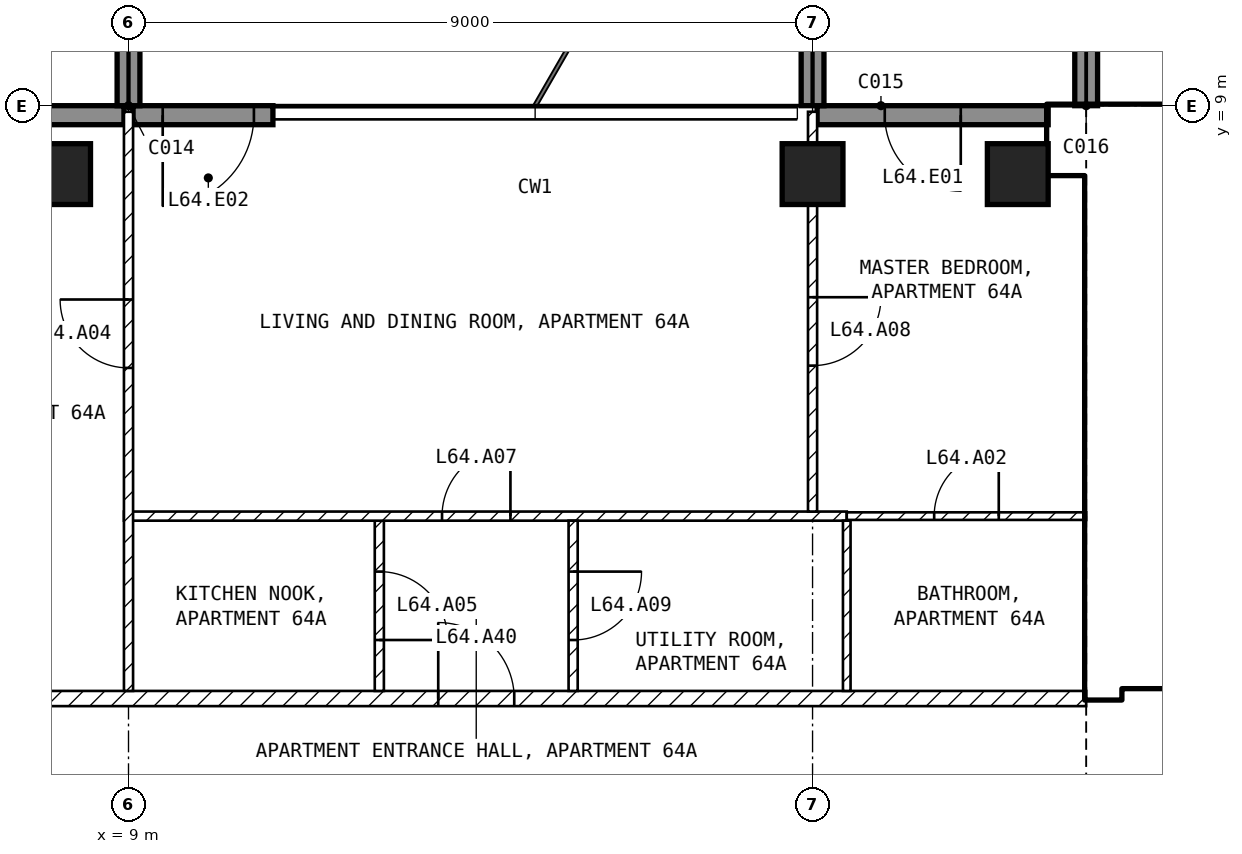
"""IFC4 building model, lengths in metres.
Left out: names, types, materials, properties, quantities, classifications, styles, units other than length and angle.
Written with IfcOpenShell. Run it as: python <this file> out.ifc"""

import sys

from ifc_helpers import new_model, si_unit, direction, frame, frame_2d, origin, origin_2d, place, context, subcontext, project, spatial, rectangle, extrude, element, fill, save


model = new_model("IFC4")
c1 = context("Model", 3, precision=1e-05, world=origin(), true_north=direction((0.0, 1.0)))
c2 = subcontext(c1, "Body", "Model", "MODEL_VIEW")
j1 = project(units=[si_unit("LENGTHUNIT", "METRE"), si_unit("PLANEANGLEUNIT", "RADIAN")], contexts=[c1])
p1 = place(None, origin())
s1 = spatial("IfcSite", under=j1, at=p1, CompositionType="ELEMENT")
p2 = place(p1, origin())
s2 = spatial("IfcBuilding", under=s1, at=p2, CompositionType="ELEMENT")
p3 = place(p2, frame((0.0, 0.0, 253.5)))
s3 = spatial("IfcBuildingStorey", under=s2, at=p3, CompositionType="ELEMENT", Elevation=253.5)
for number, where, z_axis, x_axis in (
    (1, (8.1, 8.1, -0.25), (0.0, 0.0, 1.0), (1.0, 0.0, 0.0)),
    (2, (18.0, 8.1, -0.25), (0.0, 0.0, 1.0), (1.0, 0.0, 0.0)),
    (3, (20.7, 8.1, -0.25), (0.0, 0.0, 1.0), (1.0, 0.0, 0.0)),
):
    element("IfcColumn", number, at=place(p3, frame(where, z_axis=z_axis, x_axis=x_axis)), inside=s3, PredefinedType="COLUMN", context=c2, shape_type="SweptSolid", body=[
        extrude(rectangle(XDim=0.8, YDim=0.8, at=origin_2d()), origin(), (0.0, 0.0, 1.0), 3.5),
    ])
p4 = place(p3, frame((21.1, 8.875, 0.0), z_axis=(0.0, 0.0, 1.0), x_axis=(-1.0, 0.0, 0.0)))
e4 = element("IfcWall", 4, at=p4, inside=s3, PredefinedType="SOLIDWALL", context=c2, shape_type="SweptSolid", body=[
    extrude(rectangle(XDim=3.04, YDim=0.25, at=frame_2d((1.52, 0.0))), origin(), (0.0, 0.0, 1.0), 3.25),
])
p5 = place(p4, frame((1.15, 0.0, 0.0)))
e5 = element("IfcOpeningElement", 5, at=p5, cuts=e4, PredefinedType="OPENING", context=c2, shape_type="SweptSolid", body=[
    extrude(rectangle(XDim=1.0, YDim=2.4, at=frame_2d((0.5, 1.2))), frame((0.0, 0.135, 0.0), z_axis=(0.0, -1.0, 0.0), x_axis=(1.0, 0.0, 0.0)), (0.0, 0.0, 1.0), 0.27),
])
p6 = place(p3, frame((10.9, 8.875, 0.0), z_axis=(0.0, 0.0, 1.0), x_axis=(-1.0, 0.0, 0.0)))
e6 = element("IfcWall", 6, at=p6, inside=s3, PredefinedType="SOLIDWALL", context=c2, shape_type="SweptSolid", body=[
    extrude(rectangle(XDim=1.84, YDim=0.25, at=frame_2d((0.92, 0.0))), origin(), (0.0, 0.0, 1.0), 3.25),
])
p7 = place(p6, frame((0.25, 0.0, 0.0)))
e7 = element("IfcOpeningElement", 7, at=p7, cuts=e6, PredefinedType="OPENING", context=c2, shape_type="SweptSolid", body=[
    extrude(rectangle(XDim=1.2, YDim=2.4, at=frame_2d((0.6, 1.2))), frame((0.0, 0.135, 0.0), z_axis=(0.0, -1.0, 0.0), x_axis=(1.0, 0.0, 0.0)), (0.0, 0.0, 1.0), 0.27),
])
p8 = place(p3, frame((8.94, 8.875, 0.0), z_axis=(0.0, 0.0, 1.0), x_axis=(-1.0, 0.0, 0.0)))
e8 = element("IfcWall", 8, at=p8, inside=s3, PredefinedType="SOLIDWALL", context=c2, shape_type="SweptSolid", body=[
    extrude(rectangle(XDim=3.04, YDim=0.25, at=frame_2d((1.52, 0.0))), origin(), (0.0, 0.0, 1.0), 3.25),
])
p9 = place(p8, frame((1.59, 0.0, 0.0)))
e9 = element("IfcOpeningElement", 9, at=p9, cuts=e8, PredefinedType="OPENING", context=c2, shape_type="SweptSolid", body=[
    extrude(rectangle(XDim=1.2, YDim=2.4, at=frame_2d((0.6, 1.2))), frame((0.0, 0.135, 0.0), z_axis=(0.0, -1.0, 0.0), x_axis=(1.0, 0.0, 0.0)), (0.0, 0.0, 1.0), 0.27),
])
for number, where, z_axis, x_axis in (
    (10, (9.0, 9.0, 0.0), (0.0, 0.0, 1.0), (0.0, 1.0, 0.0)),
    (11, (18.0, 9.0, 0.0), (0.0, 0.0, 1.0), (0.0, 1.0, 0.0)),
    (12, (21.6, 9.0, 0.0), (0.0, 0.0, 1.0), (0.0, 1.0, 0.0)),
):
    element("IfcWall", number, at=place(p3, frame(where, z_axis=z_axis, x_axis=x_axis)), inside=s3, PredefinedType="SOLIDWALL", context=c2, shape_type="SweptSolid", body=[
        extrude(rectangle(XDim=2.7, YDim=0.3, at=frame_2d((1.35, 0.0))), origin(), (0.0, 0.0, 1.0), 3.25),
    ])
p10 = place(p3, frame((21.1, 8.55, 0.0), z_axis=(0.0, 0.0, 1.0), x_axis=(1.0, 0.0, 0.0)))
e13 = element("IfcWall", 13, at=p10, inside=s3, PredefinedType="SHEAR", context=c2, shape_type="SweptSolid", body=[
    extrude(rectangle(XDim=8.65, YDim=0.9, at=frame_2d((4.325, 0.0))), origin(), (0.0, 0.0, 1.0), 3.25),
])
p11 = place(p3, frame((21.825, 1.2, 0.0), z_axis=(0.0, 0.0, 1.0), x_axis=(0.0, 1.0, 0.0)))
e14 = element("IfcWall", 14, at=p11, inside=s3, PredefinedType="SHEAR", context=c2, shape_type="SweptSolid", body=[
    extrude(rectangle(XDim=6.9, YDim=0.45, at=frame_2d((3.45, 0.0))), origin(), (0.0, 0.0, 1.0), 3.25),
])
p12 = place(p3, frame((22.05, 1.45, 0.0), z_axis=(0.0, 0.0, 1.0), x_axis=(1.0, 0.0, 0.0)))
e15 = element("IfcWall", 15, at=p12, inside=s3, PredefinedType="SOLIDWALL", context=c2, shape_type="SweptSolid", body=[
    extrude(rectangle(XDim=11.3, YDim=0.2, at=frame_2d((5.65, 0.0))), origin(), (0.0, 0.0, 1.0), 3.25),
])
p13 = place(p12, frame((0.75, 0.0, 0.0)))
e16 = element("IfcOpeningElement", 16, at=p13, cuts=e15, PredefinedType="OPENING", context=c2, shape_type="SweptSolid", body=[
    extrude(rectangle(XDim=1.0, YDim=2.1, at=frame_2d((0.5, 1.05))), frame((0.0, 0.11, 0.0), z_axis=(0.0, -1.0, 0.0), x_axis=(1.0, 0.0, 0.0)), (0.0, 0.0, 1.0), 0.22),
])
p14 = place(p12, frame((3.25, 0.0, 0.0)))
e17 = element("IfcOpeningElement", 17, at=p14, cuts=e15, PredefinedType="OPENING", context=c2, shape_type="SweptSolid", body=[
    extrude(rectangle(XDim=1.0, YDim=2.1, at=frame_2d((0.5, 1.05))), frame((0.0, 0.11, 0.0), z_axis=(0.0, -1.0, 0.0), x_axis=(1.0, 0.0, 0.0)), (0.0, 0.0, 1.0), 0.22),
])
p15 = place(p12, frame((9.225, 0.0, 0.0)))
e18 = element("IfcOpeningElement", 18, at=p15, cuts=e15, PredefinedType="OPENING", context=c2, shape_type="SweptSolid", body=[
    extrude(rectangle(XDim=0.9, YDim=2.1, at=frame_2d((0.45, 1.05))), frame((0.0, 0.11, 0.0), z_axis=(0.0, -1.0, 0.0), x_axis=(1.0, 0.0, 0.0)), (0.0, 0.0, 1.0), 0.22),
])
p16 = place(p3, frame((22.05, 5.15, 0.0), z_axis=(0.0, 0.0, 1.0), x_axis=(1.0, 0.0, 0.0)))
e19 = element("IfcWall", 19, at=p16, inside=s3, PredefinedType="SOLIDWALL", context=c2, shape_type="SweptSolid", body=[
    extrude(rectangle(XDim=6.3, YDim=0.2, at=frame_2d((3.15, 0.0))), origin(), (0.0, 0.0, 1.0), 3.25),
])
p17 = place(p16, frame((0.2, 0.0, 0.0)))
e20 = element("IfcOpeningElement", 20, at=p17, cuts=e19, PredefinedType="OPENING", context=c2, shape_type="SweptSolid", body=[
    extrude(rectangle(XDim=1.0, YDim=2.1, at=frame_2d((0.5, 1.05))), frame((0.0, 0.11, 0.0), z_axis=(0.0, -1.0, 0.0), x_axis=(1.0, 0.0, 0.0)), (0.0, 0.0, 1.0), 0.22),
])
p18 = place(p3, frame((4.4, 1.2, 0.0), z_axis=(0.0, 0.0, 1.0), x_axis=(1.0, 0.0, 0.0)))
e21 = element("IfcWall", 21, at=p18, inside=s3, PredefinedType="PARTITIONING", context=c2, shape_type="SweptSolid", body=[
    extrude(rectangle(XDim=17.2, YDim=0.2, at=frame_2d((8.6, 0.0))), origin(), (0.0, 0.0, 1.0), 3.25),
])
p19 = place(p18, frame((8.675, 0.0, 0.0)))
e22 = element("IfcOpeningElement", 22, at=p19, cuts=e21, PredefinedType="OPENING", context=c2, shape_type="SweptSolid", body=[
    extrude(rectangle(XDim=1.0, YDim=2.1, at=frame_2d((0.5, 1.05))), frame((0.0, 0.11, 0.0), z_axis=(0.0, -1.0, 0.0), x_axis=(1.0, 0.0, 0.0)), (0.0, 0.0, 1.0), 0.22),
])
p20 = place(p3, frame((12.3, 3.54, 0.0), z_axis=(0.0, 0.0, 1.0), x_axis=(0.0, -1.0, 0.0)))
e23 = element("IfcWall", 23, at=p20, inside=s3, PredefinedType="PARTITIONING", context=c2, shape_type="SweptSolid", body=[
    extrude(rectangle(XDim=2.24, YDim=0.12, at=frame_2d((1.12, 0.0))), origin(), (0.0, 0.0, 1.0), 3.25),
])
p21 = place(p20, frame((0.67, 0.0, 0.0)))
e24 = element("IfcOpeningElement", 24, at=p21, cuts=e23, PredefinedType="OPENING", context=c2, shape_type="SweptSolid", body=[
    extrude(rectangle(XDim=0.9, YDim=2.1, at=frame_2d((0.45, 1.05))), frame((0.0, 0.07, 0.0), z_axis=(0.0, -1.0, 0.0), x_axis=(1.0, 0.0, 0.0)), (0.0, 0.0, 1.0), 0.14),
])
p22 = place(p3, frame((8.94, 3.6, 0.0), z_axis=(0.0, 0.0, 1.0), x_axis=(1.0, 0.0, 0.0)))
e25 = element("IfcWall", 25, at=p22, inside=s3, PredefinedType="PARTITIONING", context=c2, shape_type="SweptSolid", body=[
    extrude(rectangle(XDim=9.51, YDim=0.12, at=frame_2d((4.755, 0.0))), origin(), (0.0, 0.0, 1.0), 3.25),
])
p23 = place(p22, frame((4.185, 0.0, 0.0)))
e26 = element("IfcOpeningElement", 26, at=p23, cuts=e25, PredefinedType="OPENING", context=c2, shape_type="SweptSolid", body=[
    extrude(rectangle(XDim=0.9, YDim=2.1, at=frame_2d((0.45, 1.05))), frame((0.0, 0.07, 0.0), z_axis=(0.0, -1.0, 0.0), x_axis=(1.0, 0.0, 0.0)), (0.0, 0.0, 1.0), 0.14),
])
p24 = place(p3, frame((9.0, 1.3, 0.0), z_axis=(0.0, 0.0, 1.0), x_axis=(0.0, 1.0, 0.0)))
e27 = element("IfcWall", 27, at=p24, inside=s3, PredefinedType="PARTITIONING", context=c2, shape_type="SweptSolid", body=[
    extrude(rectangle(XDim=7.62, YDim=0.12, at=frame_2d((3.81, 0.0))), origin(), (0.0, 0.0, 1.0), 3.25),
])
p25 = place(p24, frame((4.25, 0.0, 0.0)))
e28 = element("IfcOpeningElement", 28, at=p25, cuts=e27, PredefinedType="OPENING", context=c2, shape_type="SweptSolid", body=[
    extrude(rectangle(XDim=0.9, YDim=2.1, at=frame_2d((0.45, 1.05))), frame((0.0, 0.07, 0.0), z_axis=(0.0, -1.0, 0.0), x_axis=(1.0, 0.0, 0.0)), (0.0, 0.0, 1.0), 0.14),
])
p26 = place(p3, frame((14.85, 3.54, 0.0), z_axis=(0.0, 0.0, 1.0), x_axis=(0.0, -1.0, 0.0)))
e29 = element("IfcWall", 29, at=p26, inside=s3, PredefinedType="PARTITIONING", context=c2, shape_type="SweptSolid", body=[
    extrude(rectangle(XDim=2.24, YDim=0.12, at=frame_2d((1.12, 0.0))), origin(), (0.0, 0.0, 1.0), 3.25),
])
p27 = place(p26, frame((0.67, 0.0, 0.0)))
e30 = element("IfcOpeningElement", 30, at=p27, cuts=e29, PredefinedType="OPENING", context=c2, shape_type="SweptSolid", body=[
    extrude(rectangle(XDim=0.9, YDim=2.1, at=frame_2d((0.45, 1.05))), frame((0.0, 0.07, 0.0), z_axis=(0.0, -1.0, 0.0), x_axis=(1.0, 0.0, 0.0)), (0.0, 0.0, 1.0), 0.14),
])
p28 = place(p3, frame((18.45, 3.54, 0.0), z_axis=(0.0, 0.0, 1.0), x_axis=(0.0, -1.0, 0.0)))
e31 = element("IfcWall", 31, at=p28, inside=s3, PredefinedType="PARTITIONING", context=c2, shape_type="SweptSolid", body=[
    extrude(rectangle(XDim=2.24, YDim=0.1, at=frame_2d((1.12, 0.0))), origin(), (0.0, 0.0, 1.0), 3.25),
])
p29 = place(p3, frame((18.45, 3.6, 0.0), z_axis=(0.0, 0.0, 1.0), x_axis=(1.0, 0.0, 0.0)))
e32 = element("IfcWall", 32, at=p29, inside=s3, PredefinedType="PARTITIONING", context=c2, shape_type="SweptSolid", body=[
    extrude(rectangle(XDim=3.15, YDim=0.1, at=frame_2d((1.575, 0.0))), origin(), (0.0, 0.0, 1.0), 3.25),
])
p30 = place(p29, frame((1.15, 0.0, 0.0)))
e33 = element("IfcOpeningElement", 33, at=p30, cuts=e32, PredefinedType="OPENING", context=c2, shape_type="SweptSolid", body=[
    extrude(rectangle(XDim=0.85, YDim=2.1, at=frame_2d((0.425, 1.05))), frame((0.0, 0.06, 0.0), z_axis=(0.0, -1.0, 0.0), x_axis=(1.0, 0.0, 0.0)), (0.0, 0.0, 1.0), 0.12),
])
p31 = place(p3, frame((18.0, 8.92, 0.0), z_axis=(0.0, 0.0, 1.0), x_axis=(0.0, -1.0, 0.0)))
e34 = element("IfcWall", 34, at=p31, inside=s3, PredefinedType="PARTITIONING", context=c2, shape_type="SweptSolid", body=[
    extrude(rectangle(XDim=5.26, YDim=0.12, at=frame_2d((2.63, 0.0))), origin(), (0.0, 0.0, 1.0), 2.496),
])
p32 = place(p31, frame((2.44, 0.0, 0.0)))
e35 = element("IfcOpeningElement", 35, at=p32, cuts=e34, PredefinedType="OPENING", context=c2, shape_type="SweptSolid", body=[
    extrude(rectangle(XDim=0.9, YDim=2.1, at=frame_2d((0.45, 1.05))), frame((0.0, 0.07, 0.0), z_axis=(0.0, -1.0, 0.0), x_axis=(1.0, 0.0, 0.0)), (0.0, 0.0, 1.0), 0.14),
])
p33 = place(p5, origin())
e36 = element("IfcDoor", 36, at=p33, inside=s3, OperationType="SINGLE_SWING_LEFT", PredefinedType="DOOR", context=c2, shape_type="SweptSolid", body=[
    extrude(rectangle(XDim=1.0, YDim=2.4, at=frame_2d((0.5, 1.2))), frame((0.0, 0.025, 0.0), z_axis=(0.0, -1.0, 0.0), x_axis=(1.0, 0.0, 0.0)), (0.0, 0.0, 1.0), 0.05),
])
fill(e5, e36)
p34 = place(p7, origin())
e37 = element("IfcDoor", 37, at=p34, inside=s3, OperationType="SINGLE_SWING_RIGHT", PredefinedType="DOOR", context=c2, shape_type="SweptSolid", body=[
    extrude(rectangle(XDim=1.2, YDim=2.4, at=frame_2d((0.6, 1.2))), frame((0.0, 0.025, 0.0), z_axis=(0.0, -1.0, 0.0), x_axis=(1.0, 0.0, 0.0)), (0.0, 0.0, 1.0), 0.05),
])
fill(e7, e37)
p35 = place(p17, origin())
e38 = element("IfcDoor", 38, at=p35, inside=s3, OperationType="SINGLE_SWING_LEFT", PredefinedType="DOOR", context=c2, shape_type="SweptSolid", body=[
    extrude(rectangle(XDim=1.0, YDim=2.1, at=frame_2d((0.5, 1.05))), frame((0.0, 0.025, 0.0), z_axis=(0.0, -1.0, 0.0), x_axis=(1.0, 0.0, 0.0)), (0.0, 0.0, 1.0), 0.05),
])
fill(e20, e38)
p36 = place(p30, origin())
e39 = element("IfcDoor", 39, at=p36, inside=s3, OperationType="SINGLE_SWING_RIGHT", PredefinedType="DOOR", context=c2, shape_type="SweptSolid", body=[
    extrude(rectangle(XDim=0.85, YDim=2.1, at=frame_2d((0.425, 1.05))), frame((0.0, 0.025, 0.0), z_axis=(0.0, -1.0, 0.0), x_axis=(1.0, 0.0, 0.0)), (0.0, 0.0, 1.0), 0.05),
])
fill(e33, e39)
p37 = place(p25, origin())
e40 = element("IfcDoor", 40, at=p37, inside=s3, OperationType="SINGLE_SWING_RIGHT", PredefinedType="DOOR", context=c2, shape_type="SweptSolid", body=[
    extrude(rectangle(XDim=0.9, YDim=2.1, at=frame_2d((0.45, 1.05))), frame((0.0, 0.025, 0.0), z_axis=(0.0, -1.0, 0.0), x_axis=(1.0, 0.0, 0.0)), (0.0, 0.0, 1.0), 0.05),
])
fill(e28, e40)
p38 = place(p21, origin())
e41 = element("IfcDoor", 41, at=p38, inside=s3, OperationType="SINGLE_SWING_RIGHT", PredefinedType="DOOR", context=c2, shape_type="SweptSolid", body=[
    extrude(rectangle(XDim=0.9, YDim=2.1, at=frame_2d((0.45, 1.05))), frame((0.0, 0.025, 0.0), z_axis=(0.0, -1.0, 0.0), x_axis=(1.0, 0.0, 0.0)), (0.0, 0.0, 1.0), 0.05),
])
fill(e24, e41)
p39 = place(p23, origin())
e42 = element("IfcDoor", 42, at=p39, inside=s3, OperationType="SINGLE_SWING_RIGHT", PredefinedType="DOOR", context=c2, shape_type="SweptSolid", body=[
    extrude(rectangle(XDim=0.9, YDim=2.1, at=frame_2d((0.45, 1.05))), frame((0.0, 0.025, 0.0), z_axis=(0.0, -1.0, 0.0), x_axis=(1.0, 0.0, 0.0)), (0.0, 0.0, 1.0), 0.05),
])
fill(e26, e42)
p40 = place(p32, origin())
e43 = element("IfcDoor", 43, at=p40, inside=s3, OperationType="SINGLE_SWING_LEFT", PredefinedType="DOOR", context=c2, shape_type="SweptSolid", body=[
    extrude(rectangle(XDim=0.9, YDim=2.1, at=frame_2d((0.45, 1.05))), frame((0.0, 0.025, 0.0), z_axis=(0.0, -1.0, 0.0), x_axis=(1.0, 0.0, 0.0)), (0.0, 0.0, 1.0), 0.05),
])
fill(e35, e43)
p41 = place(p27, origin())
e44 = element("IfcDoor", 44, at=p41, inside=s3, OperationType="SINGLE_SWING_LEFT", PredefinedType="DOOR", context=c2, shape_type="SweptSolid", body=[
    extrude(rectangle(XDim=0.9, YDim=2.1, at=frame_2d((0.45, 1.05))), frame((0.0, 0.025, 0.0), z_axis=(0.0, -1.0, 0.0), x_axis=(1.0, 0.0, 0.0)), (0.0, 0.0, 1.0), 0.05),
])
fill(e30, e44)
p42 = place(p19, origin())
e45 = element("IfcDoor", 45, at=p42, inside=s3, OperationType="SINGLE_SWING_LEFT", PredefinedType="DOOR", context=c2, shape_type="SweptSolid", body=[
    extrude(rectangle(XDim=1.0, YDim=2.1, at=frame_2d((0.5, 1.05))), frame((0.0, 0.025, 0.0), z_axis=(0.0, -1.0, 0.0), x_axis=(1.0, 0.0, 0.0)), (0.0, 0.0, 1.0), 0.05),
])
fill(e22, e45)
save(model, sys.argv[1])
